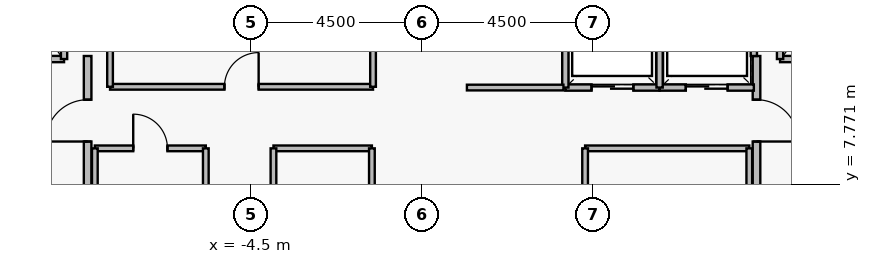
"""IFC4 building model, lengths in metres.
Left out: names, types, materials, properties, quantities, classifications, styles, units other than length and angle.
Written with IfcOpenShell. Run it as: python <this file> out.ifc"""

import sys

from ifc_helpers import new_model, si_unit, direction, frame, frame_2d, origin, place, context, subcontext, project, spatial, rectangle, extrude, element, fill, save


model = new_model("IFC4")
c1 = context("Model", 3, precision=1e-05, world=origin(), true_north=direction((0.0, 1.0)))
c2 = subcontext(c1, "Body", "Model", "MODEL_VIEW")
j1 = project(units=[si_unit("LENGTHUNIT", "METRE"), si_unit("PLANEANGLEUNIT", "RADIAN")], contexts=[c1])
p1 = place(None, origin())
s1 = spatial("IfcSite", under=j1, at=p1, CompositionType="ELEMENT")
p2 = place(p1, origin())
s2 = spatial("IfcBuilding", under=s1, at=p2, CompositionType="ELEMENT")
p3 = place(p2, frame((0.0, 0.0, 272.95)))
s3 = spatial("IfcBuildingStorey", under=s2, at=p3, CompositionType="ELEMENT", Elevation=272.95)
p4 = place(p3, frame((-8.8, 5.05, 0.0), z_axis=(0.0, 0.0, 1.0), x_axis=(0.0, 1.0, 0.0)))
e1 = element("IfcWall", 1, at=p4, inside=s3, PredefinedType="PARTITIONING", context=c2, shape_type="SweptSolid", body=[
    extrude(rectangle(XDim=6.1, YDim=0.2, at=frame_2d((3.05, 0.0))), origin(), (0.0, 0.0, 1.0), 3.48),
])
p5 = place(p4, frame((0.25, 0.0, 0.0)))
e2 = element("IfcOpeningElement", 2, at=p5, cuts=e1, PredefinedType="OPENING", context=c2, shape_type="SweptSolid", body=[
    extrude(rectangle(XDim=1.1, YDim=2.2, at=frame_2d((0.55, 1.1))), frame((0.0, 0.11, 0.0), z_axis=(0.0, -1.0, 0.0), x_axis=(1.0, 0.0, 0.0)), (0.0, 0.0, 1.0), 0.22),
])
p6 = place(p4, frame((3.85, 0.0, 0.0)))
e3 = element("IfcOpeningElement", 3, at=p6, cuts=e1, PredefinedType="OPENING", context=c2, shape_type="SweptSolid", body=[
    extrude(rectangle(XDim=1.1, YDim=2.2, at=frame_2d((0.55, 1.1))), frame((0.0, 0.11, 0.0), z_axis=(0.0, -1.0, 0.0), x_axis=(1.0, 0.0, 0.0)), (0.0, 0.0, 1.0), 0.22),
])
p7 = place(p3, frame((8.8, 11.15, 0.0), z_axis=(0.0, 0.0, 1.0), x_axis=(0.0, -1.0, 0.0)))
e4 = element("IfcWall", 4, at=p7, inside=s3, PredefinedType="PARTITIONING", context=c2, shape_type="SweptSolid", body=[
    extrude(rectangle(XDim=6.1, YDim=0.2, at=frame_2d((3.05, 0.0))), origin(), (0.0, 0.0, 1.0), 3.48),
])
p8 = place(p7, frame((1.15, 0.0, 0.0)))
e5 = element("IfcOpeningElement", 5, at=p8, cuts=e4, PredefinedType="OPENING", context=c2, shape_type="SweptSolid", body=[
    extrude(rectangle(XDim=1.1, YDim=2.2, at=frame_2d((0.55, 1.1))), frame((0.0, 0.11, 0.0), z_axis=(0.0, -1.0, 0.0), x_axis=(1.0, 0.0, 0.0)), (0.0, 0.0, 1.0), 0.22),
])
p9 = place(p7, frame((4.75, 0.0, 0.0)))
e6 = element("IfcOpeningElement", 6, at=p9, cuts=e4, PredefinedType="OPENING", context=c2, shape_type="SweptSolid", body=[
    extrude(rectangle(XDim=1.1, YDim=2.2, at=frame_2d((0.55, 1.1))), frame((0.0, 0.11, 0.0), z_axis=(0.0, -1.0, 0.0), x_axis=(1.0, 0.0, 0.0)), (0.0, 0.0, 1.0), 0.22),
])
p10 = place(p3, frame((-11.58, 11.07, 0.0), z_axis=(0.0, 0.0, 1.0), x_axis=(1.0, 0.0, 0.0)))
e7 = element("IfcWall", 7, at=p10, inside=s3, PredefinedType="PARTITIONING", context=c2, shape_type="SweptSolid", body=[
    extrude(rectangle(XDim=2.16, YDim=0.165, at=frame_2d((1.08, 0.0))), origin(), (0.0, 0.0, 1.0), 3.48),
])
p11 = place(p10, frame((0.53, 0.0, 0.0)))
e8 = element("IfcOpeningElement", 8, at=p11, cuts=e7, PredefinedType="OPENING", context=c2, shape_type="SweptSolid", body=[
    extrude(rectangle(XDim=1.15, YDim=2.25, at=frame_2d((0.575, 1.125))), frame((0.0, 0.093, 0.0), z_axis=(0.0, -1.0, 0.0), x_axis=(1.0, 0.0, 0.0)), (0.0, 0.0, 1.0), 0.185),
])
p12 = place(p3, frame((9.42, 11.07, 0.0), z_axis=(0.0, 0.0, 1.0), x_axis=(1.0, 0.0, 0.0)))
e9 = element("IfcWall", 9, at=p12, inside=s3, PredefinedType="PARTITIONING", context=c2, shape_type="SweptSolid", body=[
    extrude(rectangle(XDim=2.16, YDim=0.165, at=frame_2d((1.08, 0.0))), origin(), (0.0, 0.0, 1.0), 3.48),
])
p13 = place(p12, frame((0.53, 0.0, 0.0)))
e10 = element("IfcOpeningElement", 10, at=p13, cuts=e9, PredefinedType="OPENING", context=c2, shape_type="SweptSolid", body=[
    extrude(rectangle(XDim=1.15, YDim=2.25, at=frame_2d((0.575, 1.125))), frame((0.0, 0.093, 0.0), z_axis=(0.0, -1.0, 0.0), x_axis=(1.0, 0.0, 0.0)), (0.0, 0.0, 1.0), 0.185),
])
p14 = place(p3, frame((3.77, 10.32, 0.0), z_axis=(0.0, 0.0, 1.0), x_axis=(1.0, 0.0, 0.0)))
e11 = element("IfcWall", 11, at=p14, inside=s3, PredefinedType="PARTITIONING", context=c2, shape_type="SweptSolid", body=[
    extrude(rectangle(XDim=2.48, YDim=0.165, at=frame_2d((1.24, 0.0))), origin(), (0.0, 0.0, 1.0), 3.48),
])
p15 = place(p14, frame((0.69, 0.0, 0.0)))
e12 = element("IfcOpeningElement", 12, at=p15, cuts=e11, PredefinedType="OPENING", context=c2, shape_type="SweptSolid", body=[
    extrude(rectangle(XDim=1.1, YDim=2.25, at=frame_2d((0.55, 1.125))), frame((0.0, 0.093, 0.0), z_axis=(0.0, -1.0, 0.0), x_axis=(1.0, 0.0, 0.0)), (0.0, 0.0, 1.0), 0.185),
])
p16 = place(p3, frame((6.25, 10.32, 0.0), z_axis=(0.0, 0.0, 1.0), x_axis=(1.0, 0.0, 0.0)))
e13 = element("IfcWall", 13, at=p16, inside=s3, PredefinedType="PARTITIONING", context=c2, shape_type="SweptSolid", body=[
    extrude(rectangle(XDim=2.48, YDim=0.165, at=frame_2d((1.24, 0.0))), origin(), (0.0, 0.0, 1.0), 3.48),
])
p17 = place(p16, frame((0.69, 0.0, 0.0)))
e14 = element("IfcOpeningElement", 14, at=p17, cuts=e13, PredefinedType="OPENING", context=c2, shape_type="SweptSolid", body=[
    extrude(rectangle(XDim=1.1, YDim=2.25, at=frame_2d((0.55, 1.125))), frame((0.0, 0.093, 0.0), z_axis=(0.0, -1.0, 0.0), x_axis=(1.0, 0.0, 0.0)), (0.0, 0.0, 1.0), 0.185),
])
p18 = place(p3, frame((-8.21, 10.34, 0.0), z_axis=(0.0, 0.0, 1.0), x_axis=(1.0, 0.0, 0.0)))
e15 = element("IfcWall", 15, at=p18, inside=s3, PredefinedType="PARTITIONING", context=c2, shape_type="SweptSolid", body=[
    extrude(rectangle(XDim=6.92, YDim=0.15, at=frame_2d((3.46, 0.0))), origin(), (0.0, 0.0, 1.0), 3.48),
])
p19 = place(p18, frame((3.01, 0.0, 0.0)))
e16 = element("IfcOpeningElement", 16, at=p19, cuts=e15, PredefinedType="OPENING", context=c2, shape_type="SweptSolid", body=[
    extrude(rectangle(XDim=0.9, YDim=2.15, at=frame_2d((0.45, 1.075))), frame((0.0, 0.085, 0.0), z_axis=(0.0, -1.0, 0.0), x_axis=(1.0, 0.0, 0.0)), (0.0, 0.0, 1.0), 0.17),
])
p20 = place(p3, frame((-8.61, 8.72, 0.0), z_axis=(0.0, 0.0, 1.0), x_axis=(1.0, 0.0, 0.0)))
e17 = element("IfcWall", 17, at=p20, inside=s3, PredefinedType="PARTITIONING", context=c2, shape_type="SweptSolid", body=[
    extrude(rectangle(XDim=2.92, YDim=0.15, at=frame_2d((1.46, 0.0))), origin(), (0.0, 0.0, 1.0), 3.48),
])
p21 = place(p20, frame((1.01, 0.0, 0.0)))
e18 = element("IfcOpeningElement", 18, at=p21, cuts=e17, PredefinedType="OPENING", context=c2, shape_type="SweptSolid", body=[
    extrude(rectangle(XDim=0.9, YDim=2.15, at=frame_2d((0.45, 1.075))), frame((0.0, 0.085, 0.0), z_axis=(0.0, -1.0, 0.0), x_axis=(1.0, 0.0, 0.0)), (0.0, 0.0, 1.0), 0.17),
])
for number, where, z_axis, x_axis in (
    (19, (-9.42, 11.07, 0.0), (0.0, 0.0, 1.0), (0.0, 1.0, 0.0)),
    (20, (9.42, 11.07, 0.0), (0.0, 0.0, 1.0), (0.0, 1.0, 0.0)),
):
    element("IfcWall", number, at=place(p3, frame(where, z_axis=z_axis, x_axis=x_axis)), inside=s3, PredefinedType="PARTITIONING", context=c2, shape_type="SweptSolid", body=[
        extrude(rectangle(XDim=2.96, YDim=0.165, at=frame_2d((1.48, 0.0))), origin(), (0.0, 0.0, 1.0), 3.48),
    ])
for number, where, z_axis, x_axis in (
    (21, (3.77, 10.32, 0.0), (0.0, 0.0, 1.0), (0.0, 1.0, 0.0)),
    (22, (6.25, 10.32, 0.0), (0.0, 0.0, 1.0), (0.0, 1.0, 0.0)),
):
    element("IfcWall", number, at=place(p3, frame(where, z_axis=z_axis, x_axis=x_axis)), inside=s3, PredefinedType="PARTITIONING", context=c2, shape_type="SweptSolid", body=[
        extrude(rectangle(XDim=2.36, YDim=0.165, at=frame_2d((1.18, 0.0))), origin(), (0.0, 0.0, 1.0), 3.48),
    ])
p22 = place(p3, frame((8.73, 11.15, 0.0), z_axis=(0.0, 0.0, 1.0), x_axis=(0.0, 1.0, 0.0)))
e23 = element("IfcWall", 23, at=p22, inside=s3, PredefinedType="PARTITIONING", context=c2, shape_type="SweptSolid", body=[
    extrude(rectangle(XDim=1.53, YDim=0.165, at=frame_2d((0.765, 0.0))), origin(), (0.0, 0.0, 1.0), 3.48),
])
for number, where, z_axis, x_axis in (
    (24, (-8.21, 10.34, 0.0), (0.0, 0.0, 1.0), (0.0, 1.0, 0.0)),
    (25, (-1.29, 10.34, 0.0), (0.0, 0.0, 1.0), (0.0, 1.0, 0.0)),
):
    element("IfcWall", number, at=place(p3, frame(where, z_axis=z_axis, x_axis=x_axis)), inside=s3, PredefinedType="PARTITIONING", context=c2, shape_type="SweptSolid", body=[
        extrude(rectangle(XDim=2.52, YDim=0.15, at=frame_2d((1.26, 0.0))), origin(), (0.0, 0.0, 1.0), 3.48),
    ])
for number, where, z_axis, x_axis in (
    (26, (-8.61, 6.48, 0.0), (0.0, 0.0, 1.0), (0.0, 1.0, 0.0)),
    (27, (-5.69, 6.48, 0.0), (0.0, 0.0, 1.0), (0.0, 1.0, 0.0)),
):
    element("IfcWall", number, at=place(p3, frame(where, z_axis=z_axis, x_axis=x_axis)), inside=s3, PredefinedType="PARTITIONING", context=c2, shape_type="SweptSolid", body=[
        extrude(rectangle(XDim=2.24, YDim=0.15, at=frame_2d((1.12, 0.0))), origin(), (0.0, 0.0, 1.0), 3.48),
    ])
p23 = place(p3, frame((-3.91, 8.72, 0.0), z_axis=(0.0, 0.0, 1.0), x_axis=(1.0, 0.0, 0.0)))
e28 = element("IfcWall", 28, at=p23, inside=s3, PredefinedType="PARTITIONING", context=c2, shape_type="SweptSolid", body=[
    extrude(rectangle(XDim=2.59, YDim=0.15, at=frame_2d((1.295, 0.0))), origin(), (0.0, 0.0, 1.0), 3.48),
])
for number, where, z_axis, x_axis in (
    (29, (-3.91, 6.48, 0.0), (0.0, 0.0, 1.0), (0.0, 1.0, 0.0)),
    (30, (-1.32, 6.48, 0.0), (0.0, 0.0, 1.0), (0.0, 1.0, 0.0)),
):
    element("IfcWall", number, at=place(p3, frame(where, z_axis=z_axis, x_axis=x_axis)), inside=s3, PredefinedType="PARTITIONING", context=c2, shape_type="SweptSolid", body=[
        extrude(rectangle(XDim=2.24, YDim=0.15, at=frame_2d((1.12, 0.0))), origin(), (0.0, 0.0, 1.0), 3.48),
    ])
p24 = place(p3, frame((4.29, 8.72, 0.0), z_axis=(0.0, 0.0, 1.0), x_axis=(1.0, 0.0, 0.0)))
e31 = element("IfcWall", 31, at=p24, inside=s3, PredefinedType="PARTITIONING", context=c2, shape_type="SweptSolid", body=[
    extrude(rectangle(XDim=4.32, YDim=0.15, at=frame_2d((2.16, 0.0))), origin(), (0.0, 0.0, 1.0), 3.48),
])
for number, where, z_axis, x_axis in (
    (32, (4.29, 6.48, 0.0), (0.0, 0.0, 1.0), (0.0, 1.0, 0.0)),
    (33, (8.61, 6.48, 0.0), (0.0, 0.0, 1.0), (0.0, 1.0, 0.0)),
):
    element("IfcWall", number, at=place(p3, frame(where, z_axis=z_axis, x_axis=x_axis)), inside=s3, PredefinedType="PARTITIONING", context=c2, shape_type="SweptSolid", body=[
        extrude(rectangle(XDim=2.24, YDim=0.15, at=frame_2d((1.12, 0.0))), origin(), (0.0, 0.0, 1.0), 3.48),
    ])
p25 = place(p3, frame((1.18, 10.32, 0.0), z_axis=(0.0, 0.0, 1.0), x_axis=(1.0, 0.0, 0.0)))
e34 = element("IfcWall", 34, at=p25, inside=s3, PredefinedType="PARTITIONING", context=c2, shape_type="SweptSolid", body=[
    extrude(rectangle(XDim=2.54, YDim=0.15, at=frame_2d((1.27, 0.0))), origin(), (0.0, 0.0, 1.0), 3.48),
])
p26 = place(p6, origin())
e35 = element("IfcDoor", 35, at=p26, inside=s3, OperationType="SINGLE_SWING_LEFT", PredefinedType="DOOR", context=c2, shape_type="SweptSolid", body=[
    extrude(rectangle(XDim=1.1, YDim=2.2, at=frame_2d((0.55, 1.1))), frame((0.0, 0.025, 0.0), z_axis=(0.0, -1.0, 0.0), x_axis=(1.0, 0.0, 0.0)), (0.0, 0.0, 1.0), 0.05),
])
fill(e3, e35)
p27 = place(p8, origin())
e36 = element("IfcDoor", 36, at=p27, inside=s3, OperationType="SINGLE_SWING_RIGHT", PredefinedType="DOOR", context=c2, shape_type="SweptSolid", body=[
    extrude(rectangle(XDim=1.1, YDim=2.2, at=frame_2d((0.55, 1.1))), frame((0.0, 0.025, 0.0), z_axis=(0.0, -1.0, 0.0), x_axis=(1.0, 0.0, 0.0)), (0.0, 0.0, 1.0), 0.05),
])
fill(e5, e36)
p28 = place(p15, origin())
e37 = element("IfcDoor", 37, at=p28, inside=s3, OperationType="SLIDING_TO_LEFT", PredefinedType="DOOR", context=c2, shape_type="SweptSolid", body=[
    extrude(rectangle(XDim=1.1, YDim=2.25, at=frame_2d((0.55, 1.125))), frame((0.0, 0.025, 0.0), z_axis=(0.0, -1.0, 0.0), x_axis=(1.0, 0.0, 0.0)), (0.0, 0.0, 1.0), 0.05),
])
fill(e12, e37)
p29 = place(p17, origin())
e38 = element("IfcDoor", 38, at=p29, inside=s3, OperationType="SLIDING_TO_LEFT", PredefinedType="DOOR", context=c2, shape_type="SweptSolid", body=[
    extrude(rectangle(XDim=1.1, YDim=2.25, at=frame_2d((0.55, 1.125))), frame((0.0, 0.025, 0.0), z_axis=(0.0, -1.0, 0.0), x_axis=(1.0, 0.0, 0.0)), (0.0, 0.0, 1.0), 0.05),
])
fill(e14, e38)
p30 = place(p19, origin())
e39 = element("IfcDoor", 39, at=p30, inside=s3, OperationType="SINGLE_SWING_RIGHT", PredefinedType="DOOR", context=c2, shape_type="SweptSolid", body=[
    extrude(rectangle(XDim=0.9, YDim=2.15, at=frame_2d((0.45, 1.075))), frame((0.0, 0.025, 0.0), z_axis=(0.0, -1.0, 0.0), x_axis=(1.0, 0.0, 0.0)), (0.0, 0.0, 1.0), 0.05),
])
fill(e16, e39)
p31 = place(p21, origin())
e40 = element("IfcDoor", 40, at=p31, inside=s3, OperationType="SINGLE_SWING_LEFT", PredefinedType="DOOR", context=c2, shape_type="SweptSolid", body=[
    extrude(rectangle(XDim=0.9, YDim=2.15, at=frame_2d((0.45, 1.075))), frame((0.0, 0.025, 0.0), z_axis=(0.0, -1.0, 0.0), x_axis=(1.0, 0.0, 0.0)), (0.0, 0.0, 1.0), 0.05),
])
fill(e18, e40)
save(model, sys.argv[1])
